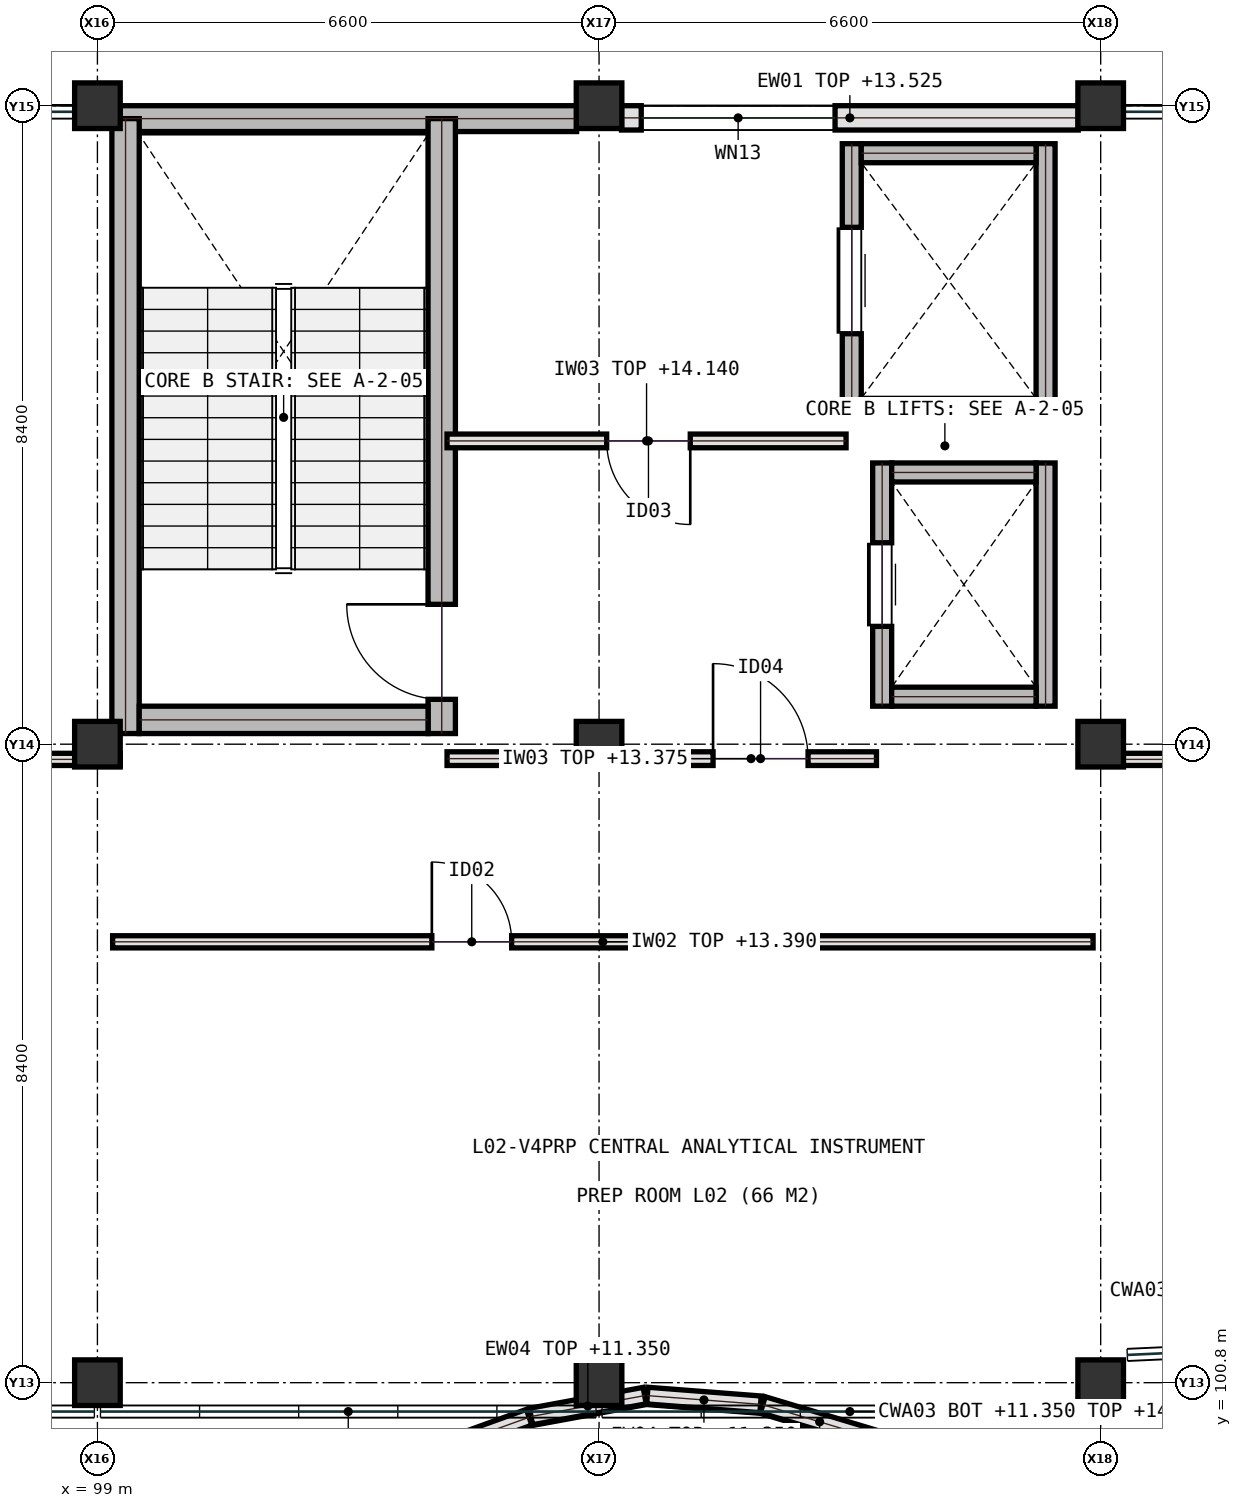
"""IFC4 building model, lengths in metres.
Left out: names, types, materials, properties, quantities, classifications, styles, units other than length and angle.
Written with IfcOpenShell. Run it as: python <this file> out.ifc"""

import sys

from ifc_helpers import new_model, si_unit, direction, frame, frame_2d, origin, origin_2d, place, context, subcontext, project, spatial, rectangle, extrude, element, fill, save


model = new_model("IFC4")
c1 = context("Model", 3, precision=1e-05, world=origin(), true_north=direction((0.0, 1.0)))
c2 = subcontext(c1, "Body", "Model", "MODEL_VIEW")
j1 = project(units=[si_unit("LENGTHUNIT", "METRE"), si_unit("PLANEANGLEUNIT", "RADIAN")], contexts=[c1])
p1 = place(None, origin())
s1 = spatial("IfcSite", under=j1, at=p1, CompositionType="ELEMENT")
p2 = place(p1, origin())
s2 = spatial("IfcBuilding", under=s1, at=p2, CompositionType="ELEMENT")
p3 = place(p2, frame((0.0, 0.0, 9.9)))
s3 = spatial("IfcBuildingStorey", under=s2, at=p3, CompositionType="ELEMENT", Elevation=9.9)
for number, where, z_axis, x_axis in (
    (1, (99.0, 100.8, 0.0), (0.0, 0.0, 1.0), (1.0, 0.0, 0.0)),
    (2, (99.0, 109.2, 0.0), (0.0, 0.0, 1.0), (1.0, 0.0, 0.0)),
    (3, (99.0, 117.6, 0.0), (0.0, 0.0, 1.0), (1.0, 0.0, 0.0)),
    (4, (105.6, 100.8, 0.0), (0.0, 0.0, 1.0), (1.0, 0.0, 0.0)),
    (5, (105.6, 109.2, 0.0), (0.0, 0.0, 1.0), (1.0, 0.0, 0.0)),
    (6, (105.6, 117.6, 0.0), (0.0, 0.0, 1.0), (1.0, 0.0, 0.0)),
    (7, (112.2, 100.8, 0.0), (0.0, 0.0, 1.0), (1.0, 0.0, 0.0)),
    (8, (112.2, 109.2, 0.0), (0.0, 0.0, 1.0), (1.0, 0.0, 0.0)),
    (9, (112.2, 117.6, 0.0), (0.0, 0.0, 1.0), (1.0, 0.0, 0.0)),
):
    element("IfcColumn", number, at=place(p3, frame(where, z_axis=z_axis, x_axis=x_axis)), inside=s3, PredefinedType="COLUMN", context=c2, shape_type="SweptSolid", body=[
        extrude(rectangle(XDim=0.6, YDim=0.6, at=origin_2d()), origin(), (0.0, 0.0, 1.0), 4.5),
    ])
p4 = place(p3, frame((92.85, 109.0, 0.0), z_axis=(0.0, 0.0, 1.0), x_axis=(1.0, 0.0, 0.0)))
e10 = element("IfcWall", 10, at=p4, inside=s3, PredefinedType="PARTITIONING", context=c2, shape_type="SweptSolid", body=[
    extrude(rectangle(XDim=6.45, YDim=0.16, at=frame_2d((3.225, 0.0))), origin(), (0.0, 0.0, 1.0), 3.475),
])
p5 = place(p3, frame((112.0, 109.0, 0.0), z_axis=(0.0, 0.0, 1.0), x_axis=(1.0, 0.0, 0.0)))
e11 = element("IfcWall", 11, at=p5, inside=s3, PredefinedType="PARTITIONING", context=c2, shape_type="SweptSolid", body=[
    extrude(rectangle(XDim=6.35, YDim=0.16, at=frame_2d((3.175, 0.0))), origin(), (0.0, 0.0, 1.0), 3.475),
])
p6 = place(p5, frame((4.85, 0.0, 0.0)))
e12 = element("IfcOpeningElement", 12, at=p6, cuts=e11, PredefinedType="OPENING", context=c2, shape_type="SweptSolid", body=[
    extrude(rectangle(XDim=1.15, YDim=2.2, at=frame_2d((0.575, 1.1))), frame((0.0, 0.09, 0.0), z_axis=(0.0, -1.0, 0.0), x_axis=(1.0, 0.0, 0.0)), (0.0, 0.0, 1.0), 0.18),
])
p7 = place(p3, frame((99.2, 106.6, 0.0), z_axis=(0.0, 0.0, 1.0), x_axis=(1.0, 0.0, 0.0)))
e13 = element("IfcWall", 13, at=p7, inside=s3, PredefinedType="PARTITIONING", context=c2, shape_type="SweptSolid", body=[
    extrude(rectangle(XDim=12.9, YDim=0.16, at=frame_2d((6.45, 0.0))), origin(), (0.0, 0.0, 1.0), 3.49),
])
p8 = place(p7, frame((4.2, 0.0, 0.0)))
e14 = element("IfcOpeningElement", 14, at=p8, cuts=e13, PredefinedType="OPENING", context=c2, shape_type="SweptSolid", body=[
    extrude(rectangle(XDim=1.05, YDim=2.15, at=frame_2d((0.525, 1.075))), frame((0.0, 0.09, 0.0), z_axis=(0.0, -1.0, 0.0), x_axis=(1.0, 0.0, 0.0)), (0.0, 0.0, 1.0), 0.18),
])
p9 = place(p3, frame((105.305, 117.43, 0.0), z_axis=(0.0, 0.0, 1.0), x_axis=(-1.0, 0.0, 0.0)))
e15 = element("IfcWall", 15, at=p9, inside=s3, PredefinedType="SHEAR", context=c2, shape_type="SweptSolid", body=[
    extrude(rectangle(XDim=6.01, YDim=0.34, at=frame_2d((3.005, 0.0))), origin(), (0.0, 0.0, 1.0), 4.24),
])
p10 = place(p3, frame((111.905, 117.44, 0.0), z_axis=(0.0, 0.0, 1.0), x_axis=(-1.0, 0.0, 0.0)))
e16 = element("IfcWall", 16, at=p10, inside=s3, PredefinedType="SOLIDWALL", context=c2, shape_type="SweptSolid", body=[
    extrude(rectangle(XDim=6.01, YDim=0.32, at=frame_2d((3.005, 0.0))), origin(), (0.0, 0.0, 1.0), 3.625),
])
p11 = place(p10, frame((3.2, 0.0, 0.95)))
e17 = element("IfcOpeningElement", 17, at=p11, cuts=e16, PredefinedType="OPENING", context=c2, shape_type="SweptSolid", body=[
    extrude(rectangle(XDim=2.55, YDim=1.65, at=frame_2d((1.275, 0.825))), frame((0.0, 0.17, 0.0), z_axis=(0.0, -1.0, 0.0), x_axis=(1.0, 0.0, 0.0)), (0.0, 0.0, 1.0), 0.34),
])
p12 = place(p3, frame((103.185, 99.805, 0.0), z_axis=(0.0, 0.0, 1.0), x_axis=(0.940508911561, 0.339769020476, 0.0)))
e18 = element("IfcWall", 18, at=p12, inside=s3, PredefinedType="SOLIDWALL", context=c2, shape_type="SweptSolid", body=[
    extrude(rectangle(XDim=1.589, YDim=0.22, at=frame_2d((0.795, 0.0))), origin(), (0.0, 0.0, 1.0), 1.45),
])
p13 = place(p3, frame((104.705, 100.355, 0.0), z_axis=(0.0, 0.0, 1.0), x_axis=(0.983508119514, 0.180863978862, 0.0)))
e19 = element("IfcWall", 19, at=p13, inside=s3, PredefinedType="SOLIDWALL", context=c2, shape_type="SweptSolid", body=[
    extrude(rectangle(XDim=1.52, YDim=0.22, at=frame_2d((0.76, 0.0))), origin(), (0.0, 0.0, 1.0), 1.45),
])
p14 = place(p3, frame((106.235, 100.63, 0.0), z_axis=(0.0, 0.0, 1.0), x_axis=(0.997035234424, -0.076946353501, 0.0)))
e20 = element("IfcWall", 20, at=p14, inside=s3, PredefinedType="SOLIDWALL", context=c2, shape_type="SweptSolid", body=[
    extrude(rectangle(XDim=1.494, YDim=0.22, at=frame_2d((0.747, 0.0))), origin(), (0.0, 0.0, 1.0), 1.45),
])
p15 = place(p3, frame((107.755, 100.51, 0.0), z_axis=(0.0, 0.0, 1.0), x_axis=(0.957576314427, -0.288179808538, 0.0)))
e21 = element("IfcWall", 21, at=p15, inside=s3, PredefinedType="SOLIDWALL", context=c2, shape_type="SweptSolid", body=[
    extrude(rectangle(XDim=1.561, YDim=0.22, at=frame_2d((0.781, 0.0))), origin(), (0.0, 0.0, 1.0), 1.45),
])
p16 = place(p3, frame((99.37, 109.34, 0.0), z_axis=(0.0, 0.0, 1.0), x_axis=(0.0, 1.0, 0.0)))
e22 = element("IfcWall", 22, at=p16, inside=s3, PredefinedType="SHEAR", context=c2, shape_type="SweptSolid", body=[
    extrude(rectangle(XDim=8.09, YDim=0.36, at=frame_2d((4.045, 0.0))), origin(), (0.0, 0.0, 1.0), 4.24),
])
p17 = place(p3, frame((103.53, 109.34, 0.0), z_axis=(0.0, 0.0, 1.0), x_axis=(0.0, 1.0, 0.0)))
e23 = element("IfcWall", 23, at=p17, inside=s3, PredefinedType="SHEAR", context=c2, shape_type="SweptSolid", body=[
    extrude(rectangle(XDim=8.09, YDim=0.36, at=frame_2d((4.045, 0.0))), origin(), (0.0, 0.0, 1.0), 4.24),
])
p18 = place(p17, frame((0.45, 0.0, 0.0)))
e24 = element("IfcOpeningElement", 24, at=p18, cuts=e23, PredefinedType="OPENING", context=c2, shape_type="SweptSolid", body=[
    extrude(rectangle(XDim=1.25, YDim=2.15, at=frame_2d((0.625, 1.075))), frame((0.0, 0.19, 0.0), z_axis=(0.0, -1.0, 0.0), x_axis=(1.0, 0.0, 0.0)), (0.0, 0.0, 1.0), 0.38),
])
p19 = place(p3, frame((99.55, 109.52, 0.0), z_axis=(0.0, 0.0, 1.0), x_axis=(1.0, 0.0, 0.0)))
e25 = element("IfcWall", 25, at=p19, inside=s3, PredefinedType="SHEAR", context=c2, shape_type="SweptSolid", body=[
    extrude(rectangle(XDim=3.8, YDim=0.36, at=frame_2d((1.9, 0.0))), origin(), (0.0, 0.0, 1.0), 4.24),
])
p20 = place(p3, frame((109.325, 109.7, 0.0), z_axis=(0.0, 0.0, 1.0), x_axis=(0.0, 1.0, 0.0)))
e26 = element("IfcWall", 26, at=p20, inside=s3, PredefinedType="SHEAR", context=c2, shape_type="SweptSolid", body=[
    extrude(rectangle(XDim=3.2, YDim=0.25, at=frame_2d((1.6, 0.0))), origin(), (0.0, 0.0, 1.0), 4.24),
])
p21 = place(p20, frame((1.05, 0.0, 0.0)))
e27 = element("IfcOpeningElement", 27, at=p21, cuts=e26, PredefinedType="OPENING", context=c2, shape_type="SweptSolid", body=[
    extrude(rectangle(XDim=1.1, YDim=2.15, at=frame_2d((0.55, 1.075))), frame((0.0, 0.135, 0.0), z_axis=(0.0, -1.0, 0.0), x_axis=(1.0, 0.0, 0.0)), (0.0, 0.0, 1.0), 0.27),
])
p22 = place(p3, frame((111.475, 109.7, 0.0), z_axis=(0.0, 0.0, 1.0), x_axis=(0.0, 1.0, 0.0)))
e28 = element("IfcWall", 28, at=p22, inside=s3, PredefinedType="SHEAR", context=c2, shape_type="SweptSolid", body=[
    extrude(rectangle(XDim=3.2, YDim=0.25, at=frame_2d((1.6, 0.0))), origin(), (0.0, 0.0, 1.0), 4.24),
])
for number, where, z_axis, x_axis in (
    (29, (109.45, 109.825, 0.0), (0.0, 0.0, 1.0), (1.0, 0.0, 0.0)),
    (30, (109.45, 112.775, 0.0), (0.0, 0.0, 1.0), (1.0, 0.0, 0.0)),
):
    element("IfcWall", number, at=place(p3, frame(where, z_axis=z_axis, x_axis=x_axis)), inside=s3, PredefinedType="SHEAR", context=c2, shape_type="SweptSolid", body=[
        extrude(rectangle(XDim=1.9, YDim=0.25, at=frame_2d((0.95, 0.0))), origin(), (0.0, 0.0, 1.0), 4.24),
    ])
p23 = place(p3, frame((108.925, 113.5, 0.0), z_axis=(0.0, 0.0, 1.0), x_axis=(0.0, 1.0, 0.0)))
e31 = element("IfcWall", 31, at=p23, inside=s3, PredefinedType="SHEAR", context=c2, shape_type="SweptSolid", body=[
    extrude(rectangle(XDim=3.6, YDim=0.25, at=frame_2d((1.8, 0.0))), origin(), (0.0, 0.0, 1.0), 4.24),
])
p24 = place(p23, frame((1.1, 0.0, 0.0)))
e32 = element("IfcOpeningElement", 32, at=p24, cuts=e31, PredefinedType="OPENING", context=c2, shape_type="SweptSolid", body=[
    extrude(rectangle(XDim=1.4, YDim=2.2, at=frame_2d((0.7, 1.1))), frame((0.0, 0.135, 0.0), z_axis=(0.0, -1.0, 0.0), x_axis=(1.0, 0.0, 0.0)), (0.0, 0.0, 1.0), 0.27),
])
p25 = place(p3, frame((111.475, 113.5, 0.0), z_axis=(0.0, 0.0, 1.0), x_axis=(0.0, 1.0, 0.0)))
e33 = element("IfcWall", 33, at=p25, inside=s3, PredefinedType="SHEAR", context=c2, shape_type="SweptSolid", body=[
    extrude(rectangle(XDim=3.6, YDim=0.25, at=frame_2d((1.8, 0.0))), origin(), (0.0, 0.0, 1.0), 4.24),
])
for number, where, z_axis, x_axis in (
    (34, (109.05, 113.625, 0.0), (0.0, 0.0, 1.0), (1.0, 0.0, 0.0)),
    (35, (109.05, 116.975, 0.0), (0.0, 0.0, 1.0), (1.0, 0.0, 0.0)),
):
    element("IfcWall", number, at=place(p3, frame(where, z_axis=z_axis, x_axis=x_axis)), inside=s3, PredefinedType="SHEAR", context=c2, shape_type="SweptSolid", body=[
        extrude(rectangle(XDim=2.3, YDim=0.25, at=frame_2d((1.15, 0.0))), origin(), (0.0, 0.0, 1.0), 4.24),
    ])
p26 = place(p3, frame((103.6, 109.01, 0.0), z_axis=(0.0, 0.0, 1.0), x_axis=(1.0, 0.0, 0.0)))
e36 = element("IfcWall", 36, at=p26, inside=s3, PredefinedType="SOLIDWALL", context=c2, shape_type="SweptSolid", body=[
    extrude(rectangle(XDim=1.65, YDim=0.18, at=frame_2d((0.825, 0.0))), origin(), (0.0, 0.0, 1.0), 3.475),
])
p27 = place(p3, frame((105.95, 109.01, 0.0), z_axis=(0.0, 0.0, 1.0), x_axis=(1.0, 0.0, 0.0)))
e37 = element("IfcWall", 37, at=p27, inside=s3, PredefinedType="SOLIDWALL", context=c2, shape_type="SweptSolid", body=[
    extrude(rectangle(XDim=3.3, YDim=0.18, at=frame_2d((1.65, 0.0))), origin(), (0.0, 0.0, 1.0), 3.475),
])
p28 = place(p27, frame((1.15, 0.0, 0.0)))
e38 = element("IfcOpeningElement", 38, at=p28, cuts=e37, PredefinedType="OPENING", context=c2, shape_type="SweptSolid", body=[
    extrude(rectangle(XDim=1.25, YDim=2.15, at=frame_2d((0.625, 1.075))), frame((0.0, 0.1, 0.0), z_axis=(0.0, -1.0, 0.0), x_axis=(1.0, 0.0, 0.0)), (0.0, 0.0, 1.0), 0.2),
])
p29 = place(p3, frame((103.6, 113.19, 0.0), z_axis=(0.0, 0.0, 1.0), x_axis=(1.0, 0.0, 0.0)))
e39 = element("IfcWall", 39, at=p29, inside=s3, PredefinedType="SOLIDWALL", context=c2, shape_type="SweptSolid", body=[
    extrude(rectangle(XDim=5.25, YDim=0.18, at=frame_2d((2.625, 0.0))), origin(), (0.0, 0.0, 1.0), 4.24),
])
p30 = place(p29, frame((2.1, 0.0, 0.0)))
e40 = element("IfcOpeningElement", 40, at=p30, cuts=e39, PredefinedType="OPENING", context=c2, shape_type="SweptSolid", body=[
    extrude(rectangle(XDim=1.1, YDim=2.15, at=frame_2d((0.55, 1.075))), frame((0.0, 0.1, 0.0), z_axis=(0.0, -1.0, 0.0), x_axis=(1.0, 0.0, 0.0)), (0.0, 0.0, 1.0), 0.2),
])
p31 = place(p8, origin())
e41 = element("IfcDoor", 41, at=p31, inside=s3, OperationType="SINGLE_SWING_LEFT", PredefinedType="DOOR", context=c2, shape_type="SweptSolid", body=[
    extrude(rectangle(XDim=1.05, YDim=2.15, at=frame_2d((0.525, 1.075))), frame((0.0, 0.025, 0.0), z_axis=(0.0, -1.0, 0.0), x_axis=(1.0, 0.0, 0.0)), (0.0, 0.0, 1.0), 0.05),
])
fill(e14, e41)
p32 = place(p11, origin())
e42 = element("IfcWindow", 42, at=p32, inside=s3, PartitioningType="SINGLE_PANEL", PredefinedType="WINDOW", context=c2, shape_type="SweptSolid", body=[
    extrude(rectangle(XDim=2.55, YDim=1.65, at=frame_2d((1.275, 0.825))), frame((0.0, 0.03, 0.0), z_axis=(0.0, -1.0, 0.0), x_axis=(1.0, 0.0, 0.0)), (0.0, 0.0, 1.0), 0.06),
])
fill(e17, e42)
p33 = place(p18, origin())
e43 = element("IfcDoor", 43, at=p33, inside=s3, OperationType="SINGLE_SWING_RIGHT", PredefinedType="DOOR", context=c2, shape_type="SweptSolid", body=[
    extrude(rectangle(XDim=1.25, YDim=2.15, at=frame_2d((0.625, 1.075))), frame((0.0, 0.025, 0.0), z_axis=(0.0, -1.0, 0.0), x_axis=(1.0, 0.0, 0.0)), (0.0, 0.0, 1.0), 0.05),
])
fill(e24, e43)
p34 = place(p21, origin())
e44 = element("IfcDoor", 44, at=p34, inside=s3, OperationType="SLIDING_TO_LEFT", PredefinedType="DOOR", context=c2, shape_type="SweptSolid", body=[
    extrude(rectangle(XDim=1.1, YDim=2.15, at=frame_2d((0.55, 1.075))), frame((0.0, 0.025, 0.0), z_axis=(0.0, -1.0, 0.0), x_axis=(1.0, 0.0, 0.0)), (0.0, 0.0, 1.0), 0.05),
])
fill(e27, e44)
p35 = place(p24, origin())
e45 = element("IfcDoor", 45, at=p35, inside=s3, OperationType="SLIDING_TO_LEFT", PredefinedType="DOOR", context=c2, shape_type="SweptSolid", body=[
    extrude(rectangle(XDim=1.4, YDim=2.2, at=frame_2d((0.7, 1.1))), frame((0.0, 0.025, 0.0), z_axis=(0.0, -1.0, 0.0), x_axis=(1.0, 0.0, 0.0)), (0.0, 0.0, 1.0), 0.05),
])
fill(e32, e45)
p36 = place(p28, origin())
e46 = element("IfcDoor", 46, at=p36, inside=s3, OperationType="SINGLE_SWING_LEFT", PredefinedType="DOOR", context=c2, shape_type="SweptSolid", body=[
    extrude(rectangle(XDim=1.25, YDim=2.15, at=frame_2d((0.625, 1.075))), frame((0.0, 0.025, 0.0), z_axis=(0.0, -1.0, 0.0), x_axis=(1.0, 0.0, 0.0)), (0.0, 0.0, 1.0), 0.05),
])
fill(e38, e46)
p37 = place(p30, frame((1.1, 0.0, 0.0), z_axis=(0.0, 0.0, 1.0), x_axis=(-1.0, 0.0, 0.0)))
e47 = element("IfcDoor", 47, at=p37, inside=s3, OperationType="SINGLE_SWING_RIGHT", PredefinedType="DOOR", context=c2, shape_type="SweptSolid", body=[
    extrude(rectangle(XDim=1.1, YDim=2.15, at=frame_2d((0.55, 1.075))), frame((0.0, 0.025, 0.0), z_axis=(0.0, -1.0, 0.0), x_axis=(1.0, 0.0, 0.0)), (0.0, 0.0, 1.0), 0.05),
])
fill(e40, e47)
save(model, sys.argv[1])
